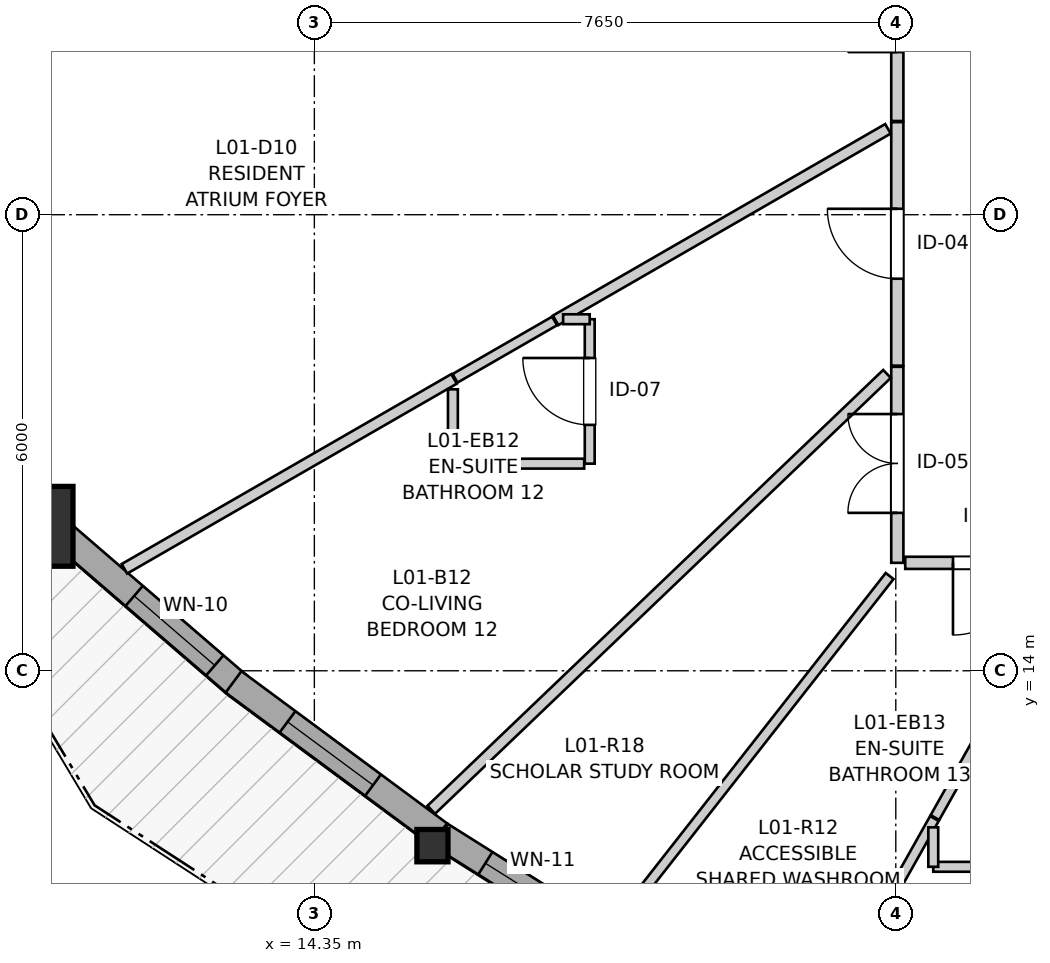
"""IFC4 building model, lengths in metres.
Left out: names, types, materials, properties, quantities, classifications, styles, units other than length and angle.
Written with IfcOpenShell. Run it as: python <this file> out.ifc"""

import sys

from ifc_helpers import new_model, si_unit, direction, frame, frame_2d, origin, origin_2d, place, context, subcontext, project, spatial, rectangle, i_section, extrude, source, transform, mapped, element, fill, save


model = new_model("IFC4")
c1 = context("Model", 3, precision=1e-05, world=origin(), true_north=direction((0.0, 1.0)))
c2 = subcontext(c1, "Body", "Model", "MODEL_VIEW")
j1 = project(units=[si_unit("LENGTHUNIT", "METRE"), si_unit("PLANEANGLEUNIT", "RADIAN")], contexts=[c1])
p1 = place(None, origin())
s1 = spatial("IfcSite", under=j1, at=p1, CompositionType="ELEMENT")
p2 = place(p1, origin())
s2 = spatial("IfcBuilding", under=s1, at=p2, CompositionType="ELEMENT")
p3 = place(p2, frame((0.0, 0.0, 7.8)))
s3 = spatial("IfcBuildingStorey", under=s2, at=p3, CompositionType="ELEMENT", Elevation=7.8)
m1 = source(origin(), c2, "Body", "SweptSolid", [
    extrude(rectangle(XDim=1.05, YDim=1.05, at=origin_2d()), origin(), (0.0, 0.0, 1.0), 2.94),
])
p4 = place(p3, frame((10.649, 15.9, 0.0), z_axis=(0.0, 0.0, 1.0), x_axis=(1.0, 0.0, 0.0)))
e1 = element("IfcColumn", 1, at=p4, inside=s3, PredefinedType="COLUMN", context=c2, shape_type="MappedRepresentation", body=[
    mapped(m1, transform((0.0, 0.0, 0.0), x_axis=(1.0, 0.0, 0.0), y_axis=(0.0, 1.0, 0.0), z_axis=(0.0, 0.0, 1.0), scale=1.0)),
])
m2 = source(origin(), c2, "Body", "SweptSolid", [
    extrude(i_section(OverallWidth=0.409, OverallDepth=0.425, WebThickness=0.03, FlangeThickness=0.048, FilletRadius=0.015, at=origin_2d()), origin(), (0.0, 0.0, 1.0), 2.94),
])
p5 = place(p3, frame((15.904, 11.699, 0.0), z_axis=(0.0, 0.0, 1.0), x_axis=(1.0, 0.0, 0.0)))
e2 = element("IfcColumn", 2, at=p5, inside=s3, PredefinedType="PILASTER", context=c2, shape_type="MappedRepresentation", body=[
    mapped(m2, transform((0.0, 0.0, 0.0), x_axis=(1.0, 0.0, 0.0), y_axis=(0.0, 1.0, 0.0), z_axis=(0.0, 0.0, 1.0), scale=1.0)),
])
p6 = place(p3, frame((10.99, 15.837, 0.0), z_axis=(0.0, 0.0, 1.0), x_axis=(0.757465946779, -0.652874673632, 0.0)))
e3 = element("IfcWall", 3, at=p6, inside=s3, PredefinedType="SOLIDWALL", context=c2, shape_type="SweptSolid", body=[
    extrude(rectangle(XDim=3.123, YDim=0.35, at=frame_2d((1.562, 0.0))), origin(), (0.0, 0.0, 1.0), 2.42),
])
p7 = place(p6, frame((1.305, 0.0, 0.82)))
e4 = element("IfcOpeningElement", 4, at=p7, cuts=e3, PredefinedType="OPENING", context=c2, shape_type="SweptSolid", body=[
    extrude(rectangle(XDim=1.4, YDim=1.35, at=frame_2d((0.7, 0.675))), frame((0.0, 0.185, 0.0), z_axis=(0.0, -1.0, 0.0), x_axis=(1.0, 0.0, 0.0)), (0.0, 0.0, 1.0), 0.37),
])
p8 = place(p3, frame((13.287, 13.854, 0.0), z_axis=(0.0, 0.0, 1.0), x_axis=(0.803848837202, -0.594833629622, 0.0)))
e5 = element("IfcWall", 5, at=p8, inside=s3, PredefinedType="SOLIDWALL", context=c2, shape_type="SweptSolid", body=[
    extrude(rectangle(XDim=3.365, YDim=0.35, at=frame_2d((1.683, 0.0))), origin(), (0.0, 0.0, 1.0), 2.42),
])
p9 = place(p8, frame((0.883, 0.0, 0.82)))
e6 = element("IfcOpeningElement", 6, at=p9, cuts=e5, PredefinedType="OPENING", context=c2, shape_type="SweptSolid", body=[
    extrude(rectangle(XDim=1.4, YDim=1.35, at=frame_2d((0.7, 0.675))), frame((0.0, 0.185, 0.0), z_axis=(0.0, -1.0, 0.0), x_axis=(1.0, 0.0, 0.0)), (0.0, 0.0, 1.0), 0.37),
])
p10 = place(p3, frame((16.014, 11.837, 0.0), z_axis=(0.0, 0.0, 1.0), x_axis=(0.846420438233, -0.532515203295, 0.0)))
e7 = element("IfcWall", 7, at=p10, inside=s3, PredefinedType="SOLIDWALL", context=c2, shape_type="SweptSolid", body=[
    extrude(rectangle(XDim=3.346, YDim=0.35, at=frame_2d((1.673, 0.0))), origin(), (0.0, 0.0, 1.0), 2.42),
])
p11 = place(p10, frame((0.692, 0.0, 0.82)))
e8 = element("IfcOpeningElement", 8, at=p11, cuts=e7, PredefinedType="OPENING", context=c2, shape_type="SweptSolid", body=[
    extrude(rectangle(XDim=1.25, YDim=1.35, at=frame_2d((0.625, 0.675))), frame((0.0, 0.185, 0.0), z_axis=(0.0, -1.0, 0.0), x_axis=(1.0, 0.0, 0.0)), (0.0, 0.0, 1.0), 0.37),
])
p12 = place(p3, frame((22.02, 18.014, 0.0), z_axis=(0.0, 0.0, 1.0), x_axis=(0.0, 1.0, 0.0)))
e9 = element("IfcWall", 9, at=p12, inside=s3, PredefinedType="PARTITIONING", context=c2, shape_type="SweptSolid", body=[
    extrude(rectangle(XDim=3.204, YDim=0.16, at=frame_2d((1.602, 0.0))), origin(), (0.0, 0.0, 1.0), 2.94),
])
p13 = place(p12, frame((1.144, 0.0, 0.0)))
e10 = element("IfcOpeningElement", 10, at=p13, cuts=e9, PredefinedType="OPENING", context=c2, shape_type="SweptSolid", body=[
    extrude(rectangle(XDim=0.92, YDim=2.1, at=frame_2d((0.46, 1.05))), frame((0.0, 0.09, 0.0), z_axis=(0.0, -1.0, 0.0), x_axis=(1.0, 0.0, 0.0)), (0.0, 0.0, 1.0), 0.18),
])
p14 = place(p3, frame((22.02, 21.233, 0.0), z_axis=(0.0, 0.0, 1.0), x_axis=(0.0, 1.0, 0.0)))
e11 = element("IfcWall", 11, at=p14, inside=s3, PredefinedType="PARTITIONING", context=c2, shape_type="SweptSolid", body=[
    extrude(rectangle(XDim=2.917, YDim=0.16, at=frame_2d((1.458, 0.0))), origin(), (0.0, 0.0, 1.0), 2.94),
])
p15 = place(p14, frame((0.906, 0.0, 0.0)))
e12 = element("IfcOpeningElement", 12, at=p15, cuts=e11, PredefinedType="OPENING", context=c2, shape_type="SweptSolid", body=[
    extrude(rectangle(XDim=1.3, YDim=2.1, at=frame_2d((0.65, 1.05))), frame((0.0, 0.09, 0.0), z_axis=(0.0, -1.0, 0.0), x_axis=(1.0, 0.0, 0.0)), (0.0, 0.0, 1.0), 0.18),
])
p16 = place(p3, frame((22.02, 15.42, 0.0), z_axis=(0.0, 0.0, 1.0), x_axis=(0.0, 1.0, 0.0)))
e13 = element("IfcWall", 13, at=p16, inside=s3, PredefinedType="PARTITIONING", context=c2, shape_type="SweptSolid", body=[
    extrude(rectangle(XDim=2.579, YDim=0.16, at=frame_2d((1.29, 0.0))), origin(), (0.0, 0.0, 1.0), 2.94),
])
p17 = place(p16, frame((0.657, 0.0, 0.0)))
e14 = element("IfcOpeningElement", 14, at=p17, cuts=e13, PredefinedType="OPENING", context=c2, shape_type="SweptSolid", body=[
    extrude(rectangle(XDim=1.3, YDim=2.1, at=frame_2d((0.65, 1.05))), frame((0.0, 0.09, 0.0), z_axis=(0.0, -1.0, 0.0), x_axis=(1.0, 0.0, 0.0)), (0.0, 0.0, 1.0), 0.18),
])
p18 = place(p3, frame((24.368, 15.42, 0.0), z_axis=(0.0, 0.0, 1.0), x_axis=(-1.0, 0.0, 0.0)))
e15 = element("IfcWall", 15, at=p18, inside=s3, PredefinedType="PARTITIONING", context=c2, shape_type="SweptSolid", body=[
    extrude(rectangle(XDim=2.244, YDim=0.16, at=frame_2d((1.122, 0.0))), origin(), (0.0, 0.0, 1.0), 2.94),
])
p19 = place(p18, frame((0.666, 0.0, 0.0)))
e16 = element("IfcOpeningElement", 16, at=p19, cuts=e15, PredefinedType="OPENING", context=c2, shape_type="SweptSolid", body=[
    extrude(rectangle(XDim=0.95, YDim=2.1, at=frame_2d((0.475, 1.05))), frame((0.0, 0.09, 0.0), z_axis=(0.0, -1.0, 0.0), x_axis=(1.0, 0.0, 0.0)), (0.0, 0.0, 1.0), 0.18),
])
p20 = place(p3, frame((17.973, 16.725, 0.0), z_axis=(0.0, 0.0, 1.0), x_axis=(0.0, 1.0, 0.0)))
e17 = element("IfcWall", 17, at=p20, inside=s3, PredefinedType="PARTITIONING", context=c2, shape_type="SweptSolid", body=[
    extrude(rectangle(XDim=1.9, YDim=0.13, at=frame_2d((0.95, 0.0))), origin(), (0.0, 0.0, 1.0), 2.94),
])
p21 = place(p20, frame((0.51, 0.0, 0.0)))
e18 = element("IfcOpeningElement", 18, at=p21, cuts=e17, PredefinedType="OPENING", context=c2, shape_type="SweptSolid", body=[
    extrude(rectangle(XDim=0.88, YDim=2.05, at=frame_2d((0.44, 1.025))), frame((0.0, 0.075, 0.0), z_axis=(0.0, -1.0, 0.0), x_axis=(1.0, 0.0, 0.0)), (0.0, 0.0, 1.0), 0.15),
])
p22 = place(p3, frame((15.888, 12.171, 0.0), z_axis=(0.0, 0.0, 1.0), x_axis=(0.722733244608, 0.691127091886, 0.0)))
e19 = element("IfcWall", 19, at=p22, inside=s3, PredefinedType="PARTITIONING", context=c2, shape_type="SweptSolid", body=[
    extrude(rectangle(XDim=8.296, YDim=0.145, at=frame_2d((4.148, 0.0))), origin(), (0.0, 0.0, 1.0), 2.94),
])
p23 = place(p3, frame((18.296, 10.625, 0.0), z_axis=(0.0, 0.0, 1.0), x_axis=(0.616906721473, 0.787036274261, 0.0)))
e20 = element("IfcWall", 20, at=p23, inside=s3, PredefinedType="PARTITIONING", context=c2, shape_type="SweptSolid", body=[
    extrude(rectangle(XDim=5.872, YDim=0.13, at=frame_2d((2.936, 0.0))), origin(), (0.0, 0.0, 1.0), 2.94),
])
p24 = place(p3, frame((17.524, 18.61, 0.0), z_axis=(0.0, 0.0, 1.0), x_axis=(0.866454437228, 0.499256154903, 0.0)))
e21 = element("IfcWall", 21, at=p24, inside=s3, PredefinedType="PARTITIONING", context=c2, shape_type="SweptSolid", body=[
    extrude(rectangle(XDim=5.047, YDim=0.145, at=frame_2d((2.523, 0.0))), origin(), (0.0, 0.0, 1.0), 2.94),
])
p25 = place(p3, frame((11.851, 15.342, 0.0), z_axis=(0.0, 0.0, 1.0), x_axis=(0.86649075999, 0.499193111784, 0.0)))
e22 = element("IfcWall", 22, at=p25, inside=s3, PredefinedType="PARTITIONING", context=c2, shape_type="SweptSolid", body=[
    extrude(rectangle(XDim=5.005, YDim=0.145, at=frame_2d((2.502, 0.0))), origin(), (0.0, 0.0, 1.0), 2.94),
])
p26 = place(p3, frame((20.894, 9.187, 0.0), z_axis=(0.0, 0.0, 1.0), x_axis=(0.490433761368, 0.871478471169, 0.0)))
e23 = element("IfcWall", 23, at=p26, inside=s3, PredefinedType="PARTITIONING", context=c2, shape_type="SweptSolid", body=[
    extrude(rectangle(XDim=3.292, YDim=0.13, at=frame_2d((1.646, 0.0))), origin(), (0.0, 0.0, 1.0), 2.94),
])
p27 = place(p3, frame((16.173, 16.725, 0.0), z_axis=(0.0, 0.0, 1.0), x_axis=(1.0, 0.0, 0.0)))
e24 = element("IfcWall", 24, at=p27, inside=s3, PredefinedType="PARTITIONING", context=c2, shape_type="SweptSolid", body=[
    extrude(rectangle(XDim=1.727, YDim=0.13, at=frame_2d((0.863, 0.0))), origin(), (0.0, 0.0, 1.0), 2.94),
])
p28 = place(p3, frame((22.493, 11.421, 0.0), z_axis=(0.0, 0.0, 1.0), x_axis=(1.0, 0.0, 0.0)))
e25 = element("IfcWall", 25, at=p28, inside=s3, PredefinedType="PARTITIONING", context=c2, shape_type="SweptSolid", body=[
    extrude(rectangle(XDim=1.727, YDim=0.13, at=frame_2d((0.864, 0.0))), origin(), (0.0, 0.0, 1.0), 2.508),
])
p29 = place(p3, frame((16.201, 17.848, 0.0), z_axis=(0.0, 0.0, 1.0), x_axis=(0.866448907576, 0.49926575144, 0.0)))
e26 = element("IfcWall", 26, at=p29, inside=s3, PredefinedType="PARTITIONING", context=c2, shape_type="SweptSolid", body=[
    extrude(rectangle(XDim=1.512, YDim=0.13, at=frame_2d((0.756, 0.0))), origin(), (0.0, 0.0, 1.0), 2.94),
])
p30 = place(p3, frame((22.515, 12.069, 0.0), z_axis=(0.0, 0.0, 1.0), x_axis=(0.490286002917, 0.871561607314, 0.0)))
e27 = element("IfcWall", 27, at=p30, inside=s3, PredefinedType="PARTITIONING", context=c2, shape_type="SweptSolid", body=[
    extrude(rectangle(XDim=1.404, YDim=0.13, at=frame_2d((0.702, 0.0))), origin(), (0.0, 0.0, 1.0), 2.94),
])
p31 = place(p3, frame((16.173, 16.798, 0.0), z_axis=(0.0, 0.0, 1.0), x_axis=(0.0, 1.0, 0.0)))
e28 = element("IfcWall", 28, at=p31, inside=s3, PredefinedType="PARTITIONING", context=c2, shape_type="SweptSolid", body=[
    extrude(rectangle(XDim=0.905, YDim=0.13, at=frame_2d((0.452, 0.0))), origin(), (0.0, 0.0, 1.0), 2.94),
])
p32 = place(p3, frame((22.493, 11.421, 0.0), z_axis=(0.0, 0.0, 1.0), x_axis=(0.0, 1.0, 0.0)))
e29 = element("IfcWall", 29, at=p32, inside=s3, PredefinedType="PARTITIONING", context=c2, shape_type="SweptSolid", body=[
    extrude(rectangle(XDim=0.519, YDim=0.13, at=frame_2d((0.26, 0.0))), origin(), (0.0, 0.0, 1.0), 2.94),
])
p33 = place(p3, frame((17.623, 18.625, 0.0), z_axis=(0.0, 0.0, 1.0), x_axis=(1.0, 0.0, 0.0)))
e30 = element("IfcWall", 30, at=p33, inside=s3, PredefinedType="PARTITIONING", context=c2, shape_type="SweptSolid", body=[
    extrude(rectangle(XDim=0.35, YDim=0.13, at=frame_2d((0.175, 0.0))), origin(), (0.0, 0.0, 1.0), 2.94),
])
m3 = source(origin(), c2, "Body", "SweptSolid", [
    extrude(rectangle(XDim=1.4, YDim=1.35, at=frame_2d((0.7, 0.675))), frame((0.0, 0.03, 0.0), z_axis=(0.0, -1.0, 0.0), x_axis=(1.0, 0.0, 0.0)), (0.0, 0.0, 1.0), 0.06),
])
p34 = place(p7, origin())
e31 = element("IfcWindow", 31, at=p34, inside=s3, PartitioningType="SINGLE_PANEL", PredefinedType="WINDOW", context=c2, shape_type="MappedRepresentation", body=[
    mapped(m3, transform((0.0, 0.0, 0.0), x_axis=(1.0, 0.0, 0.0), y_axis=(0.0, 1.0, 0.0), z_axis=(0.0, 0.0, 1.0), scale=1.0)),
])
fill(e4, e31)
p35 = place(p9, origin())
e32 = element("IfcWindow", 32, at=p35, inside=s3, PartitioningType="SINGLE_PANEL", PredefinedType="WINDOW", context=c2, shape_type="MappedRepresentation", body=[
    mapped(m3, transform((0.0, 0.0, 0.0), x_axis=(1.0, 0.0, 0.0), y_axis=(0.0, 1.0, 0.0), z_axis=(0.0, 0.0, 1.0), scale=1.0)),
])
fill(e6, e32)
m4 = source(origin(), c2, "Body", "SweptSolid", [
    extrude(rectangle(XDim=1.25, YDim=1.35, at=frame_2d((0.625, 0.675))), frame((0.0, 0.03, 0.0), z_axis=(0.0, -1.0, 0.0), x_axis=(1.0, 0.0, 0.0)), (0.0, 0.0, 1.0), 0.06),
])
p36 = place(p11, origin())
e33 = element("IfcWindow", 33, at=p36, inside=s3, PartitioningType="SINGLE_PANEL", PredefinedType="WINDOW", context=c2, shape_type="MappedRepresentation", body=[
    mapped(m4, transform((0.0, 0.0, 0.0), x_axis=(1.0, 0.0, 0.0), y_axis=(0.0, 1.0, 0.0), z_axis=(0.0, 0.0, 1.0), scale=1.0)),
])
fill(e8, e33)
m5 = source(origin(), c2, "Body", "SweptSolid", [
    extrude(rectangle(XDim=0.92, YDim=2.1, at=frame_2d((0.46, 1.05))), frame((0.0, 0.025, 0.0), z_axis=(0.0, -1.0, 0.0), x_axis=(1.0, 0.0, 0.0)), (0.0, 0.0, 1.0), 0.05),
])
p37 = place(p13, origin())
e34 = element("IfcDoor", 34, at=p37, inside=s3, OperationType="SINGLE_SWING_RIGHT", PredefinedType="DOOR", context=c2, shape_type="MappedRepresentation", body=[
    mapped(m5, transform((0.0, 0.0, 0.0), x_axis=(1.0, 0.0, 0.0), y_axis=(0.0, 1.0, 0.0), z_axis=(0.0, 0.0, 1.0), scale=1.0)),
])
fill(e10, e34)
m6 = source(origin(), c2, "Body", "SweptSolid", [
    extrude(rectangle(XDim=1.3, YDim=2.1, at=frame_2d((0.65, 1.05))), frame((0.0, 0.025, 0.0), z_axis=(0.0, -1.0, 0.0), x_axis=(1.0, 0.0, 0.0)), (0.0, 0.0, 1.0), 0.05),
])
p38 = place(p17, origin())
e35 = element("IfcDoor", 35, at=p38, inside=s3, OperationType="DOUBLE_DOOR_SINGLE_SWING", PredefinedType="DOOR", context=c2, shape_type="MappedRepresentation", body=[
    mapped(m6, transform((0.0, 0.0, 0.0), x_axis=(1.0, 0.0, 0.0), y_axis=(0.0, 1.0, 0.0), z_axis=(0.0, 0.0, 1.0), scale=1.0)),
])
fill(e14, e35)
m7 = source(origin(), c2, "Body", "SweptSolid", [
    extrude(rectangle(XDim=0.95, YDim=2.1, at=frame_2d((0.475, 1.05))), frame((0.0, 0.025, 0.0), z_axis=(0.0, -1.0, 0.0), x_axis=(1.0, 0.0, 0.0)), (0.0, 0.0, 1.0), 0.05),
])
p39 = place(p19, origin())
e36 = element("IfcDoor", 36, at=p39, inside=s3, OperationType="SINGLE_SWING_RIGHT", PredefinedType="DOOR", context=c2, shape_type="MappedRepresentation", body=[
    mapped(m7, transform((0.0, 0.0, 0.0), x_axis=(1.0, 0.0, 0.0), y_axis=(0.0, 1.0, 0.0), z_axis=(0.0, 0.0, 1.0), scale=1.0)),
])
fill(e16, e36)
m8 = source(origin(), c2, "Body", "SweptSolid", [
    extrude(rectangle(XDim=0.88, YDim=2.05, at=frame_2d((0.44, 1.025))), frame((0.0, 0.025, 0.0), z_axis=(0.0, -1.0, 0.0), x_axis=(1.0, 0.0, 0.0)), (0.0, 0.0, 1.0), 0.05),
])
p40 = place(p21, origin())
e37 = element("IfcDoor", 37, at=p40, inside=s3, OperationType="SINGLE_SWING_RIGHT", PredefinedType="DOOR", context=c2, shape_type="MappedRepresentation", body=[
    mapped(m8, transform((0.0, 0.0, 0.0), x_axis=(1.0, 0.0, 0.0), y_axis=(0.0, 1.0, 0.0), z_axis=(0.0, 0.0, 1.0), scale=1.0)),
])
fill(e18, e37)
save(model, sys.argv[1])
